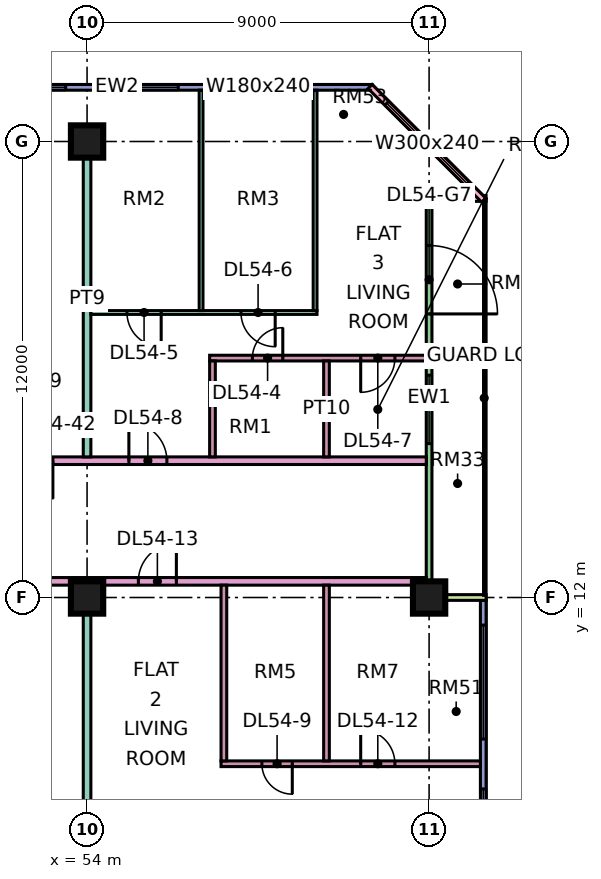
"""IFC4 building model, lengths in metres.
Left out: names, types, materials, properties, quantities, classifications, styles, units other than length and angle.
Written with IfcOpenShell. Run it as: python <this file> out.ifc"""

import sys

from ifc_helpers import new_model, si_unit, direction, frame, frame_2d, origin, origin_2d, place, context, subcontext, project, spatial, rectangle, extrude, element, fill, save


model = new_model("IFC4")
c1 = context("Model", 3, precision=1e-05, world=origin(), true_north=direction((0.0, 1.0)))
c2 = subcontext(c1, "Body", "Model", "MODEL_VIEW")
j1 = project(units=[si_unit("LENGTHUNIT", "METRE"), si_unit("PLANEANGLEUNIT", "RADIAN")], contexts=[c1])
p1 = place(None, origin())
s1 = spatial("IfcSite", under=j1, at=p1, CompositionType="ELEMENT")
p2 = place(p1, origin())
s2 = spatial("IfcBuilding", under=s1, at=p2, CompositionType="ELEMENT")
p3 = place(p2, frame((0.0, 0.0, 230.4)))
s3 = spatial("IfcBuildingStorey", under=s2, at=p3, CompositionType="ELEMENT", Elevation=230.4)
for number, where, z_axis, x_axis in (
    (1, (54.0, 12.0, 0.0), (0.0, 0.0, 1.0), (1.0, 0.0, 0.0)),
    (2, (54.0, 24.0, 0.0), (0.0, 0.0, 1.0), (1.0, 0.0, 0.0)),
    (3, (63.0, 12.0, 0.0), (0.0, 0.0, 1.0), (1.0, 0.0, 0.0)),
):
    element("IfcColumn", number, at=place(p3, frame(where, z_axis=z_axis, x_axis=x_axis)), inside=s3, PredefinedType="COLUMN", context=c2, shape_type="SweptSolid", body=[
        extrude(rectangle(XDim=0.85, YDim=0.85, at=origin_2d()), origin(), (0.0, 0.0, 1.0), 3.75),
    ])
p4 = place(p3, frame((61.5, 25.425, 0.0), z_axis=(0.0, 0.0, 1.0), x_axis=(-1.0, 0.0, 0.0)))
e4 = element("IfcWall", 4, at=p4, inside=s3, PredefinedType="SOLIDWALL", context=c2, shape_type="SweptSolid", body=[
    extrude(rectangle(XDim=13.425, YDim=0.15, at=frame_2d((6.712, 0.0))), origin(), (0.0, 0.0, 1.0), 3.35),
])
p5 = place(p4, frame((2.1, 0.0, 0.45)))
e5 = element("IfcOpeningElement", 5, at=p5, cuts=e4, PredefinedType="OPENING", context=c2, shape_type="SweptSolid", body=[
    extrude(rectangle(XDim=1.8, YDim=2.4, at=frame_2d((0.9, 1.2))), frame((0.0, 0.085, 0.0), z_axis=(0.0, -1.0, 0.0), x_axis=(1.0, 0.0, 0.0)), (0.0, 0.0, 1.0), 0.17),
])
p6 = place(p4, frame((5.1, 0.0, 0.45)))
e6 = element("IfcOpeningElement", 6, at=p6, cuts=e4, PredefinedType="OPENING", context=c2, shape_type="SweptSolid", body=[
    extrude(rectangle(XDim=1.8, YDim=2.4, at=frame_2d((0.9, 1.2))), frame((0.0, 0.085, 0.0), z_axis=(0.0, -1.0, 0.0), x_axis=(1.0, 0.0, 0.0)), (0.0, 0.0, 1.0), 0.17),
])
p7 = place(p4, frame((8.062, 0.0, 0.45)))
e7 = element("IfcOpeningElement", 7, at=p7, cuts=e4, PredefinedType="OPENING", context=c2, shape_type="SweptSolid", body=[
    extrude(rectangle(XDim=4.8, YDim=2.4, at=frame_2d((2.4, 1.2))), frame((0.0, 0.085, 0.0), z_axis=(0.0, -1.0, 0.0), x_axis=(1.0, 0.0, 0.0)), (0.0, 0.0, 1.0), 0.17),
])
p8 = place(p3, frame((64.425, 1.5, 0.0), z_axis=(0.0, 0.0, 1.0), x_axis=(0.0, 1.0, 0.0)))
e8 = element("IfcWall", 8, at=p8, inside=s3, PredefinedType="SOLIDWALL", context=c2, shape_type="SweptSolid", body=[
    extrude(rectangle(XDim=10.425, YDim=0.15, at=frame_2d((5.212, 0.0))), origin(), (0.0, 0.0, 1.0), 3.35),
])
p9 = place(p8, frame((0.663, 0.0, 0.45)))
e9 = element("IfcOpeningElement", 9, at=p9, cuts=e8, PredefinedType="OPENING", context=c2, shape_type="SweptSolid", body=[
    extrude(rectangle(XDim=4.8, YDim=2.4, at=frame_2d((2.4, 1.2))), frame((0.0, 0.085, 0.0), z_axis=(0.0, -1.0, 0.0), x_axis=(1.0, 0.0, 0.0)), (0.0, 0.0, 1.0), 0.17),
])
p10 = place(p8, frame((6.775, 0.0, 0.45)))
e10 = element("IfcOpeningElement", 10, at=p10, cuts=e8, PredefinedType="OPENING", context=c2, shape_type="SweptSolid", body=[
    extrude(rectangle(XDim=3.0, YDim=2.4, at=frame_2d((1.5, 1.2))), frame((0.0, 0.085, 0.0), z_axis=(0.0, -1.0, 0.0), x_axis=(1.0, 0.0, 0.0)), (0.0, 0.0, 1.0), 0.17),
])
p11 = place(p3, frame((63.0, 12.075, 0.0), z_axis=(0.0, 0.0, 1.0), x_axis=(0.0, 1.0, 0.0)))
e11 = element("IfcWall", 11, at=p11, inside=s3, PredefinedType="SOLIDWALL", context=c2, shape_type="SweptSolid", body=[
    extrude(rectangle(XDim=10.35, YDim=0.15, at=frame_2d((5.175, 0.0))), origin(), (0.0, 0.0, 1.0), 3.35),
])
p12 = place(p11, frame((3.975, 0.0, 0.45)))
e12 = element("IfcOpeningElement", 12, at=p12, cuts=e11, PredefinedType="OPENING", context=c2, shape_type="SweptSolid", body=[
    extrude(rectangle(XDim=1.8, YDim=2.4, at=frame_2d((0.9, 1.2))), frame((0.0, 0.085, 0.0), z_axis=(0.0, -1.0, 0.0), x_axis=(1.0, 0.0, 0.0)), (0.0, 0.0, 1.0), 0.17),
])
p13 = place(p11, frame((7.387, 0.0, 0.0)))
e13 = element("IfcOpeningElement", 13, at=p13, cuts=e11, PredefinedType="OPENING", context=c2, shape_type="SweptSolid", body=[
    extrude(rectangle(XDim=1.8, YDim=2.4, at=frame_2d((0.9, 1.2))), frame((0.0, 0.085, 0.0), z_axis=(0.0, -1.0, 0.0), x_axis=(1.0, 0.0, 0.0)), (0.0, 0.0, 1.0), 0.17),
])
for number, where, z_axis, x_axis in (
    (14, (64.5, 12.0, 0.0), (0.0, 0.0, 1.0), (-1.0, 0.0, 0.0)),
    (15, (64.5, 22.5, 0.0), (0.0, 0.0, 1.0), (-1.0, 0.0, 0.0)),
):
    element("IfcWall", number, at=place(p3, frame(where, z_axis=z_axis, x_axis=x_axis)), inside=s3, PredefinedType="SOLIDWALL", context=c2, shape_type="SweptSolid", body=[
        extrude(rectangle(XDim=1.5, YDim=0.15, at=frame_2d((0.75, 0.0))), origin(), (0.0, 0.0, 1.0), 3.35),
    ])
p14 = place(p3, frame((64.447, 22.447, 0.0), z_axis=(0.0, 0.0, 1.0), x_axis=(-0.707106781187, 0.707106781187, 0.0)))
e16 = element("IfcWall", 16, at=p14, inside=s3, PredefinedType="SOLIDWALL", context=c2, shape_type="SweptSolid", body=[
    extrude(rectangle(XDim=4.243, YDim=0.15, at=frame_2d((2.121, 0.0))), origin(), (0.0, 0.0, 1.0), 3.35),
])
p15 = place(p14, frame((0.621, 0.0, 0.45)))
e17 = element("IfcOpeningElement", 17, at=p15, cuts=e16, PredefinedType="OPENING", context=c2, shape_type="SweptSolid", body=[
    extrude(rectangle(XDim=3.0, YDim=2.4, at=frame_2d((1.5, 1.2))), frame((0.0, 0.085, 0.0), z_axis=(0.0, -1.0, 0.0), x_axis=(1.0, 0.0, 0.0)), (0.0, 0.0, 1.0), 0.17),
])
p16 = place(p3, frame((40.65, 12.425, 0.0), z_axis=(0.0, 0.0, 1.0), x_axis=(1.0, 0.0, 0.0)))
e18 = element("IfcWall", 18, at=p16, inside=s3, PredefinedType="PARTITIONING", context=c2, shape_type="SweptSolid", body=[
    extrude(rectangle(XDim=22.276, YDim=0.2, at=frame_2d((11.138, 0.0))), origin(), (0.0, 0.0, 1.0), 3.35),
])
p17 = place(p16, frame((14.7, 0.0, 0.0)))
e19 = element("IfcOpeningElement", 19, at=p17, cuts=e18, PredefinedType="OPENING", context=c2, shape_type="SweptSolid", body=[
    extrude(rectangle(XDim=1.0, YDim=2.1, at=frame_2d((0.5, 1.05))), frame((0.0, 0.11, 0.0), z_axis=(0.0, -1.0, 0.0), x_axis=(1.0, 0.0, 0.0)), (0.0, 0.0, 1.0), 0.22),
])
p18 = place(p16, frame((1.05, 0.0, 0.0)))
e20 = element("IfcOpeningElement", 20, at=p18, cuts=e18, PredefinedType="OPENING", context=c2, shape_type="SweptSolid", body=[
    extrude(rectangle(XDim=1.0, YDim=2.1, at=frame_2d((0.5, 1.05))), frame((0.0, 0.11, 0.0), z_axis=(0.0, -1.0, 0.0), x_axis=(1.0, 0.0, 0.0)), (0.0, 0.0, 1.0), 0.22),
])
p19 = place(p3, frame((51.225, 15.6, 0.0), z_axis=(0.0, 0.0, 1.0), x_axis=(1.0, 0.0, 0.0)))
e21 = element("IfcWall", 21, at=p19, inside=s3, PredefinedType="PARTITIONING", context=c2, shape_type="SweptSolid", body=[
    extrude(rectangle(XDim=11.701, YDim=0.2, at=frame_2d((5.851, 0.0))), origin(), (0.0, 0.0, 1.0), 3.35),
])
p20 = place(p19, frame((3.875, 0.0, 0.0)))
e22 = element("IfcOpeningElement", 22, at=p20, cuts=e21, PredefinedType="OPENING", context=c2, shape_type="SweptSolid", body=[
    extrude(rectangle(XDim=1.0, YDim=2.1, at=frame_2d((0.5, 1.05))), frame((0.0, 0.11, 0.0), z_axis=(0.0, -1.0, 0.0), x_axis=(1.0, 0.0, 0.0)), (0.0, 0.0, 1.0), 0.22),
])
p21 = place(p19, frame((0.875, 0.0, 0.0)))
e23 = element("IfcOpeningElement", 23, at=p21, cuts=e21, PredefinedType="OPENING", context=c2, shape_type="SweptSolid", body=[
    extrude(rectangle(XDim=1.0, YDim=2.1, at=frame_2d((0.5, 1.05))), frame((0.0, 0.11, 0.0), z_axis=(0.0, -1.0, 0.0), x_axis=(1.0, 0.0, 0.0)), (0.0, 0.0, 1.0), 0.22),
])
p22 = place(p3, frame((54.0, -1.351, 0.0), z_axis=(0.0, 0.0, 1.0), x_axis=(0.0, 1.0, 0.0)))
e24 = element("IfcWall", 24, at=p22, inside=s3, PredefinedType="PARTITIONING", context=c2, shape_type="SweptSolid", body=[
    extrude(rectangle(XDim=13.676, YDim=0.2, at=frame_2d((6.838, 0.0))), origin(), (0.0, 0.0, 1.0), 3.35),
])
p23 = place(p3, frame((54.0, 15.7, 0.0), z_axis=(0.0, 0.0, 1.0), x_axis=(0.0, 1.0, 0.0)))
e25 = element("IfcWall", 25, at=p23, inside=s3, PredefinedType="PARTITIONING", context=c2, shape_type="SweptSolid", body=[
    extrude(rectangle(XDim=8.3, YDim=0.2, at=frame_2d((4.15, 0.0))), origin(), (0.0, 0.0, 1.0), 3.35),
])
p24 = place(p3, frame((54.1, 19.5, 0.0), z_axis=(0.0, 0.0, 1.0), x_axis=(1.0, 0.0, 0.0)))
e26 = element("IfcWall", 26, at=p24, inside=s3, PredefinedType="PARTITIONING", context=c2, shape_type="SweptSolid", body=[
    extrude(rectangle(XDim=5.95, YDim=0.1, at=frame_2d((2.975, 0.0))), origin(), (0.0, 0.0, 1.0), 3.35),
])
p25 = place(p24, frame((0.95, 0.0, 0.0)))
e27 = element("IfcOpeningElement", 27, at=p25, cuts=e26, PredefinedType="OPENING", context=c2, shape_type="SweptSolid", body=[
    extrude(rectangle(XDim=0.9, YDim=2.1, at=frame_2d((0.45, 1.05))), frame((0.0, 0.06, 0.0), z_axis=(0.0, -1.0, 0.0), x_axis=(1.0, 0.0, 0.0)), (0.0, 0.0, 1.0), 0.12),
])
p26 = place(p24, frame((3.95, 0.0, 0.0)))
e28 = element("IfcOpeningElement", 28, at=p26, cuts=e26, PredefinedType="OPENING", context=c2, shape_type="SweptSolid", body=[
    extrude(rectangle(XDim=0.9, YDim=2.1, at=frame_2d((0.45, 1.05))), frame((0.0, 0.06, 0.0), z_axis=(0.0, -1.0, 0.0), x_axis=(1.0, 0.0, 0.0)), (0.0, 0.0, 1.0), 0.12),
])
p27 = place(p3, frame((57.0, 19.55, 0.0), z_axis=(0.0, 0.0, 1.0), x_axis=(0.0, 1.0, 0.0)))
e29 = element("IfcWall", 29, at=p27, inside=s3, PredefinedType="PARTITIONING", context=c2, shape_type="SweptSolid", body=[
    extrude(rectangle(XDim=5.801, YDim=0.1, at=frame_2d((2.9, 0.0))), origin(), (0.0, 0.0, 1.0), 3.35),
])
p28 = place(p3, frame((57.225, 18.3, 0.0), z_axis=(0.0, 0.0, 1.0), x_axis=(1.0, 0.0, 0.0)))
e30 = element("IfcWall", 30, at=p28, inside=s3, PredefinedType="PARTITIONING", context=c2, shape_type="SweptSolid", body=[
    extrude(rectangle(XDim=5.701, YDim=0.15, at=frame_2d((2.851, 0.0))), origin(), (0.0, 0.0, 1.0), 3.35),
])
p29 = place(p28, frame((1.125, 0.0, 0.0)))
e31 = element("IfcOpeningElement", 31, at=p29, cuts=e30, PredefinedType="OPENING", context=c2, shape_type="SweptSolid", body=[
    extrude(rectangle(XDim=0.8, YDim=2.1, at=frame_2d((0.4, 1.05))), frame((0.0, 0.085, 0.0), z_axis=(0.0, -1.0, 0.0), x_axis=(1.0, 0.0, 0.0)), (0.0, 0.0, 1.0), 0.17),
])
p30 = place(p28, frame((3.975, 0.0, 0.0)))
e32 = element("IfcOpeningElement", 32, at=p30, cuts=e30, PredefinedType="OPENING", context=c2, shape_type="SweptSolid", body=[
    extrude(rectangle(XDim=0.9, YDim=2.1, at=frame_2d((0.45, 1.05))), frame((0.0, 0.085, 0.0), z_axis=(0.0, -1.0, 0.0), x_axis=(1.0, 0.0, 0.0)), (0.0, 0.0, 1.0), 0.17),
])
p31 = place(p3, frame((57.3, 15.7, 0.0), z_axis=(0.0, 0.0, 1.0), x_axis=(0.0, 1.0, 0.0)))
e33 = element("IfcWall", 33, at=p31, inside=s3, PredefinedType="PARTITIONING", context=c2, shape_type="SweptSolid", body=[
    extrude(rectangle(XDim=2.525, YDim=0.15, at=frame_2d((1.263, 0.0))), origin(), (0.0, 0.0, 1.0), 3.35),
])
p32 = place(p3, frame((57.525, 7.625, 0.0), z_axis=(0.0, 0.0, 1.0), x_axis=(1.0, 0.0, 0.0)))
e34 = element("IfcWall", 34, at=p32, inside=s3, PredefinedType="PARTITIONING", context=c2, shape_type="SweptSolid", body=[
    extrude(rectangle(XDim=6.825, YDim=0.15, at=frame_2d((3.413, 0.0))), origin(), (0.0, 0.0, 1.0), 3.35),
])
p33 = place(p32, frame((1.075, 0.0, 0.0)))
e35 = element("IfcOpeningElement", 35, at=p33, cuts=e34, PredefinedType="OPENING", context=c2, shape_type="SweptSolid", body=[
    extrude(rectangle(XDim=0.8, YDim=2.1, at=frame_2d((0.4, 1.05))), frame((0.0, 0.085, 0.0), z_axis=(0.0, -1.0, 0.0), x_axis=(1.0, 0.0, 0.0)), (0.0, 0.0, 1.0), 0.17),
])
p34 = place(p32, frame((3.675, 0.0, 0.0)))
e36 = element("IfcOpeningElement", 36, at=p34, cuts=e34, PredefinedType="OPENING", context=c2, shape_type="SweptSolid", body=[
    extrude(rectangle(XDim=0.9, YDim=2.1, at=frame_2d((0.45, 1.05))), frame((0.0, 0.085, 0.0), z_axis=(0.0, -1.0, 0.0), x_axis=(1.0, 0.0, 0.0)), (0.0, 0.0, 1.0), 0.17),
])
p35 = place(p3, frame((57.6, 7.7, 0.0), z_axis=(0.0, 0.0, 1.0), x_axis=(0.0, 1.0, 0.0)))
e37 = element("IfcWall", 37, at=p35, inside=s3, PredefinedType="PARTITIONING", context=c2, shape_type="SweptSolid", body=[
    extrude(rectangle(XDim=4.625, YDim=0.15, at=frame_2d((2.312, 0.0))), origin(), (0.0, 0.0, 1.0), 3.35),
])
p36 = place(p3, frame((60.0, 19.55, 0.0), z_axis=(0.0, 0.0, 1.0), x_axis=(0.0, 1.0, 0.0)))
e38 = element("IfcWall", 38, at=p36, inside=s3, PredefinedType="PARTITIONING", context=c2, shape_type="SweptSolid", body=[
    extrude(rectangle(XDim=5.8, YDim=0.1, at=frame_2d((2.9, 0.0))), origin(), (0.0, 0.0, 1.0), 3.35),
])
p37 = place(p3, frame((60.3, 7.7, 0.0), z_axis=(0.0, 0.0, 1.0), x_axis=(0.0, 1.0, 0.0)))
e39 = element("IfcWall", 39, at=p37, inside=s3, PredefinedType="PARTITIONING", context=c2, shape_type="SweptSolid", body=[
    extrude(rectangle(XDim=4.625, YDim=0.15, at=frame_2d((2.312, 0.0))), origin(), (0.0, 0.0, 1.0), 3.35),
])
p38 = place(p3, frame((60.3, 15.7, 0.0), z_axis=(0.0, 0.0, 1.0), x_axis=(0.0, 1.0, 0.0)))
e40 = element("IfcWall", 40, at=p38, inside=s3, PredefinedType="PARTITIONING", context=c2, shape_type="SweptSolid", body=[
    extrude(rectangle(XDim=2.525, YDim=0.15, at=frame_2d((1.263, 0.0))), origin(), (0.0, 0.0, 1.0), 3.35),
])
p39 = place(p5, origin())
e41 = element("IfcWindow", 41, at=p39, inside=s3, PartitioningType="SINGLE_PANEL", PredefinedType="WINDOW", context=c2, shape_type="SweptSolid", body=[
    extrude(rectangle(XDim=1.8, YDim=2.4, at=frame_2d((0.9, 1.2))), frame((0.0, 0.03, 0.0), z_axis=(0.0, -1.0, 0.0), x_axis=(1.0, 0.0, 0.0)), (0.0, 0.0, 1.0), 0.06),
])
fill(e5, e41)
p40 = place(p6, origin())
e42 = element("IfcWindow", 42, at=p40, inside=s3, PartitioningType="SINGLE_PANEL", PredefinedType="WINDOW", context=c2, shape_type="SweptSolid", body=[
    extrude(rectangle(XDim=1.8, YDim=2.4, at=frame_2d((0.9, 1.2))), frame((0.0, 0.03, 0.0), z_axis=(0.0, -1.0, 0.0), x_axis=(1.0, 0.0, 0.0)), (0.0, 0.0, 1.0), 0.06),
])
fill(e6, e42)
p41 = place(p7, origin())
e43 = element("IfcWindow", 43, at=p41, inside=s3, PartitioningType="SINGLE_PANEL", PredefinedType="WINDOW", context=c2, shape_type="SweptSolid", body=[
    extrude(rectangle(XDim=4.8, YDim=2.4, at=frame_2d((2.4, 1.2))), frame((0.0, 0.03, 0.0), z_axis=(0.0, -1.0, 0.0), x_axis=(1.0, 0.0, 0.0)), (0.0, 0.0, 1.0), 0.06),
])
fill(e7, e43)
p42 = place(p9, origin())
e44 = element("IfcWindow", 44, at=p42, inside=s3, PartitioningType="SINGLE_PANEL", PredefinedType="WINDOW", context=c2, shape_type="SweptSolid", body=[
    extrude(rectangle(XDim=4.8, YDim=2.4, at=frame_2d((2.4, 1.2))), frame((0.0, 0.03, 0.0), z_axis=(0.0, -1.0, 0.0), x_axis=(1.0, 0.0, 0.0)), (0.0, 0.0, 1.0), 0.06),
])
fill(e9, e44)
p43 = place(p10, origin())
e45 = element("IfcWindow", 45, at=p43, inside=s3, PartitioningType="SINGLE_PANEL", PredefinedType="WINDOW", context=c2, shape_type="SweptSolid", body=[
    extrude(rectangle(XDim=3.0, YDim=2.4, at=frame_2d((1.5, 1.2))), frame((0.0, 0.03, 0.0), z_axis=(0.0, -1.0, 0.0), x_axis=(1.0, 0.0, 0.0)), (0.0, 0.0, 1.0), 0.06),
])
fill(e10, e45)
p44 = place(p12, origin())
e46 = element("IfcWindow", 46, at=p44, inside=s3, PartitioningType="SINGLE_PANEL", PredefinedType="WINDOW", context=c2, shape_type="SweptSolid", body=[
    extrude(rectangle(XDim=1.8, YDim=2.4, at=frame_2d((0.9, 1.2))), frame((0.0, 0.03, 0.0), z_axis=(0.0, -1.0, 0.0), x_axis=(1.0, 0.0, 0.0)), (0.0, 0.0, 1.0), 0.06),
])
fill(e12, e46)
p45 = place(p13, frame((1.8, 0.0, 0.0), z_axis=(0.0, 0.0, 1.0), x_axis=(-1.0, 0.0, 0.0)))
e47 = element("IfcDoor", 47, at=p45, inside=s3, OperationType="DOUBLE_DOOR_SINGLE_SWING", PredefinedType="DOOR", context=c2, shape_type="SweptSolid", body=[
    extrude(rectangle(XDim=1.8, YDim=2.4, at=frame_2d((0.9, 1.2))), frame((0.0, 0.025, 0.0), z_axis=(0.0, -1.0, 0.0), x_axis=(1.0, 0.0, 0.0)), (0.0, 0.0, 1.0), 0.05),
])
fill(e13, e47)
p46 = place(p15, origin())
e48 = element("IfcWindow", 48, at=p46, inside=s3, PartitioningType="SINGLE_PANEL", PredefinedType="WINDOW", context=c2, shape_type="SweptSolid", body=[
    extrude(rectangle(XDim=3.0, YDim=2.4, at=frame_2d((1.5, 1.2))), frame((0.0, 0.03, 0.0), z_axis=(0.0, -1.0, 0.0), x_axis=(1.0, 0.0, 0.0)), (0.0, 0.0, 1.0), 0.06),
])
fill(e17, e48)
p47 = place(p29, frame((0.8, 0.0, 0.0), z_axis=(0.0, 0.0, 1.0), x_axis=(-1.0, 0.0, 0.0)))
e49 = element("IfcDoor", 49, at=p47, inside=s3, OperationType="SINGLE_SWING_RIGHT", PredefinedType="DOOR", context=c2, shape_type="SweptSolid", body=[
    extrude(rectangle(XDim=0.8, YDim=2.1, at=frame_2d((0.4, 1.05))), frame((0.0, 0.025, 0.0), z_axis=(0.0, -1.0, 0.0), x_axis=(1.0, 0.0, 0.0)), (0.0, 0.0, 1.0), 0.05),
])
fill(e31, e49)
p48 = place(p25, origin())
e50 = element("IfcDoor", 50, at=p48, inside=s3, OperationType="SINGLE_SWING_RIGHT", PredefinedType="DOOR", context=c2, shape_type="SweptSolid", body=[
    extrude(rectangle(XDim=0.9, YDim=2.1, at=frame_2d((0.45, 1.05))), frame((0.0, 0.025, 0.0), z_axis=(0.0, -1.0, 0.0), x_axis=(1.0, 0.0, 0.0)), (0.0, 0.0, 1.0), 0.05),
])
fill(e27, e50)
p49 = place(p26, origin())
e51 = element("IfcDoor", 51, at=p49, inside=s3, OperationType="SINGLE_SWING_RIGHT", PredefinedType="DOOR", context=c2, shape_type="SweptSolid", body=[
    extrude(rectangle(XDim=0.9, YDim=2.1, at=frame_2d((0.45, 1.05))), frame((0.0, 0.025, 0.0), z_axis=(0.0, -1.0, 0.0), x_axis=(1.0, 0.0, 0.0)), (0.0, 0.0, 1.0), 0.05),
])
fill(e28, e51)
p50 = place(p30, frame((0.9, 0.0, 0.0), z_axis=(0.0, 0.0, 1.0), x_axis=(-1.0, 0.0, 0.0)))
e52 = element("IfcDoor", 52, at=p50, inside=s3, OperationType="SINGLE_SWING_LEFT", PredefinedType="DOOR", context=c2, shape_type="SweptSolid", body=[
    extrude(rectangle(XDim=0.9, YDim=2.1, at=frame_2d((0.45, 1.05))), frame((0.0, 0.025, 0.0), z_axis=(0.0, -1.0, 0.0), x_axis=(1.0, 0.0, 0.0)), (0.0, 0.0, 1.0), 0.05),
])
fill(e32, e52)
p51 = place(p20, origin())
e53 = element("IfcDoor", 53, at=p51, inside=s3, OperationType="SINGLE_SWING_LEFT", PredefinedType="DOOR", context=c2, shape_type="SweptSolid", body=[
    extrude(rectangle(XDim=1.0, YDim=2.1, at=frame_2d((0.5, 1.05))), frame((0.0, 0.025, 0.0), z_axis=(0.0, -1.0, 0.0), x_axis=(1.0, 0.0, 0.0)), (0.0, 0.0, 1.0), 0.05),
])
fill(e22, e53)
p52 = place(p33, origin())
e54 = element("IfcDoor", 54, at=p52, inside=s3, OperationType="SINGLE_SWING_RIGHT", PredefinedType="DOOR", context=c2, shape_type="SweptSolid", body=[
    extrude(rectangle(XDim=0.8, YDim=2.1, at=frame_2d((0.4, 1.05))), frame((0.0, 0.025, 0.0), z_axis=(0.0, -1.0, 0.0), x_axis=(1.0, 0.0, 0.0)), (0.0, 0.0, 1.0), 0.05),
])
fill(e35, e54)
p53 = place(p34, origin())
e55 = element("IfcDoor", 55, at=p53, inside=s3, OperationType="SINGLE_SWING_LEFT", PredefinedType="DOOR", context=c2, shape_type="SweptSolid", body=[
    extrude(rectangle(XDim=0.9, YDim=2.1, at=frame_2d((0.45, 1.05))), frame((0.0, 0.025, 0.0), z_axis=(0.0, -1.0, 0.0), x_axis=(1.0, 0.0, 0.0)), (0.0, 0.0, 1.0), 0.05),
])
fill(e36, e55)
p54 = place(p17, frame((1.0, 0.0, 0.0), z_axis=(0.0, 0.0, 1.0), x_axis=(-1.0, 0.0, 0.0)))
e56 = element("IfcDoor", 56, at=p54, inside=s3, OperationType="SINGLE_SWING_RIGHT", PredefinedType="DOOR", context=c2, shape_type="SweptSolid", body=[
    extrude(rectangle(XDim=1.0, YDim=2.1, at=frame_2d((0.5, 1.05))), frame((0.0, 0.025, 0.0), z_axis=(0.0, -1.0, 0.0), x_axis=(1.0, 0.0, 0.0)), (0.0, 0.0, 1.0), 0.05),
])
fill(e19, e56)
p55 = place(p21, origin())
e57 = element("IfcDoor", 57, at=p55, inside=s3, OperationType="SINGLE_SWING_RIGHT", PredefinedType="DOOR", context=c2, shape_type="SweptSolid", body=[
    extrude(rectangle(XDim=1.0, YDim=2.1, at=frame_2d((0.5, 1.05))), frame((0.0, 0.025, 0.0), z_axis=(0.0, -1.0, 0.0), x_axis=(1.0, 0.0, 0.0)), (0.0, 0.0, 1.0), 0.05),
])
fill(e23, e57)
save(model, sys.argv[1])
